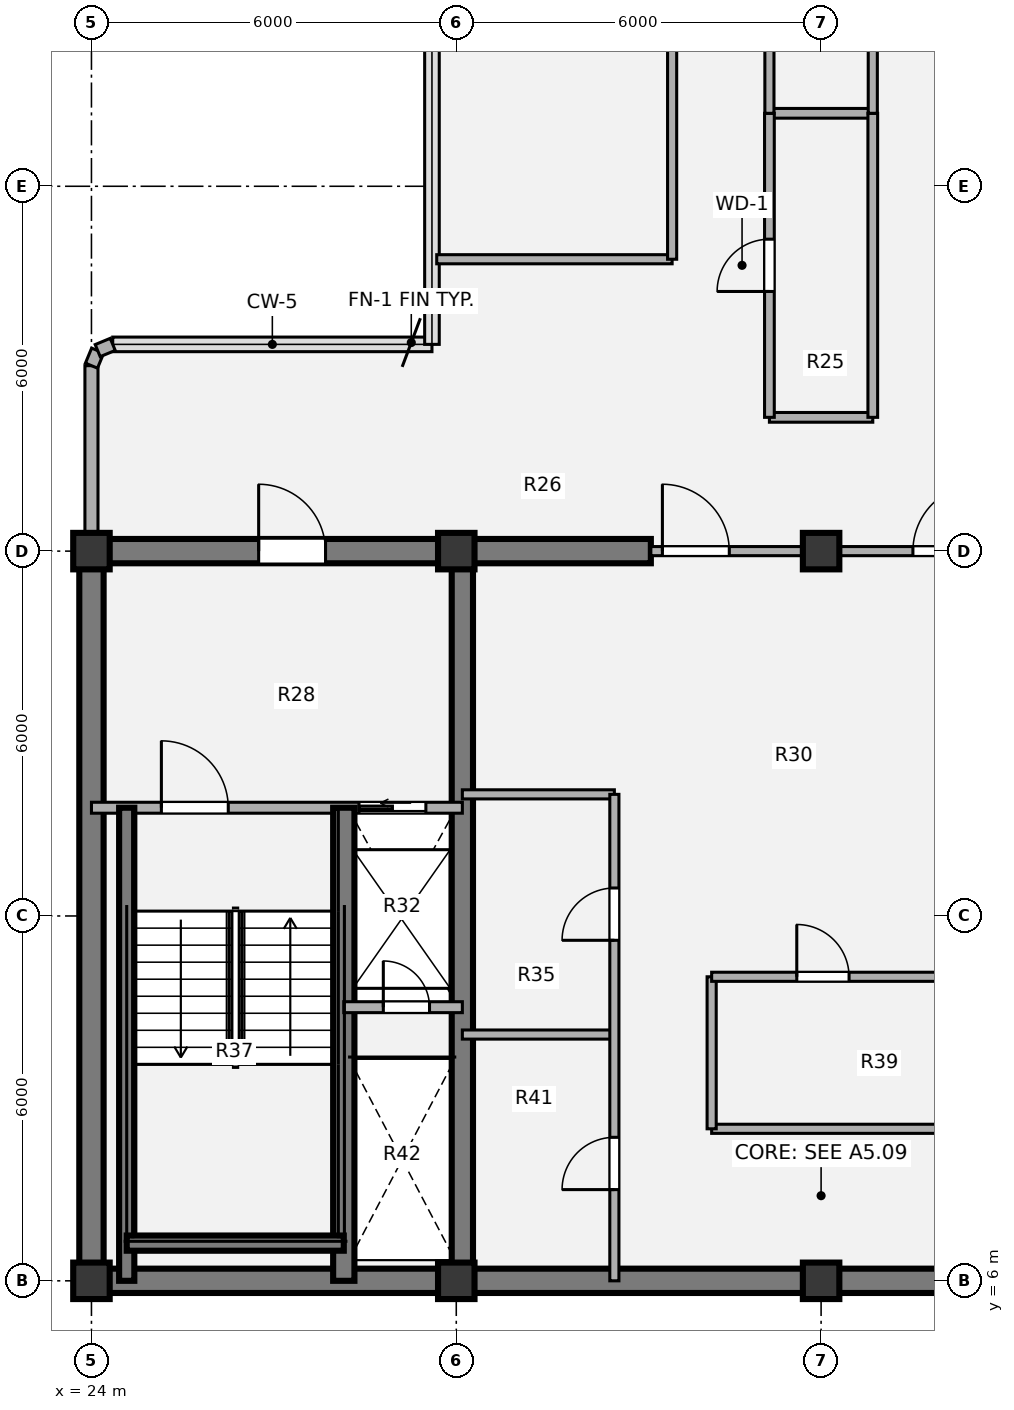
"""IFC4 building model, lengths in metres.
Left out: names, types, materials, properties, quantities, classifications, styles, units other than length and angle.
Written with IfcOpenShell. Run it as: python <this file> out.ifc"""

import sys

from ifc_helpers import new_model, si_unit, direction, frame, frame_2d, origin, origin_2d, place, context, subcontext, project, spatial, rectangle, extrude, source, transform, mapped, element, fill, save


model = new_model("IFC4")
c1 = context("Model", 3, precision=1e-05, world=origin(), true_north=direction((0.0, 1.0)))
c2 = subcontext(c1, "Body", "Model", "MODEL_VIEW")
j1 = project(units=[si_unit("LENGTHUNIT", "METRE"), si_unit("PLANEANGLEUNIT", "RADIAN")], contexts=[c1])
p1 = place(None, origin())
s1 = spatial("IfcSite", under=j1, at=p1, CompositionType="ELEMENT")
p2 = place(p1, origin())
s2 = spatial("IfcBuilding", under=s1, at=p2, CompositionType="ELEMENT")
p3 = place(p2, frame((0.0, 0.0, 234.36)))
s3 = spatial("IfcBuildingStorey", under=s2, at=p3, CompositionType="ELEMENT", Elevation=234.36)
m1 = source(origin(), c2, "Body", "SweptSolid", [
    extrude(rectangle(XDim=0.6, YDim=0.6, at=origin_2d()), origin(), (0.0, 0.0, 1.0), 3.78),
])
for number, where, z_axis, x_axis in (
    (1, (24.0, 6.0, 0.0), (0.0, 0.0, 1.0), (1.0, 0.0, 0.0)),
    (2, (30.0, 6.0, 0.0), (0.0, 0.0, 1.0), (1.0, 0.0, 0.0)),
    (3, (36.0, 6.0, 0.0), (0.0, 0.0, 1.0), (1.0, 0.0, 0.0)),
    (4, (24.0, 18.0, 0.0), (0.0, 0.0, 1.0), (1.0, 0.0, 0.0)),
    (5, (30.0, 18.0, 0.0), (0.0, 0.0, 1.0), (1.0, 0.0, 0.0)),
    (6, (36.0, 18.0, 0.0), (0.0, 0.0, 1.0), (1.0, 0.0, 0.0)),
):
    element("IfcColumn", number, at=place(p3, frame(where, z_axis=z_axis, x_axis=x_axis)), inside=s3, PredefinedType="COLUMN", context=c2, shape_type="MappedRepresentation", body=[
        mapped(m1, transform((0.0, 0.0, 0.0), x_axis=(1.0, 0.0, 0.0), y_axis=(0.0, 1.0, 0.0), z_axis=(0.0, 0.0, 1.0), scale=1.0)),
    ])
p4 = place(p3, frame((48.2, 6.0, 0.0), z_axis=(0.0, 0.0, 1.0), x_axis=(-1.0, 0.0, 0.0)))
e7 = element("IfcWall", 7, at=p4, inside=s3, PredefinedType="SHEAR", context=c2, shape_type="SweptSolid", body=[
    extrude(rectangle(XDim=24.4, YDim=0.4, at=frame_2d((12.2, 0.0))), origin(), (0.0, 0.0, 1.0), 3.78),
])
p5 = place(p3, frame((24.0, 6.0, 0.0), z_axis=(0.0, 0.0, 1.0), x_axis=(0.0, 1.0, 0.0)))
e8 = element("IfcWall", 8, at=p5, inside=s3, PredefinedType="SHEAR", context=c2, shape_type="SweptSolid", body=[
    extrude(rectangle(XDim=12.0, YDim=0.4, at=frame_2d((6.0, 0.0))), origin(), (0.0, 0.0, 1.0), 3.78),
])
p6 = place(p3, frame((23.8, 18.0, 0.0), z_axis=(0.0, 0.0, 1.0), x_axis=(1.0, 0.0, 0.0)))
e9 = element("IfcWall", 9, at=p6, inside=s3, PredefinedType="SHEAR", context=c2, shape_type="SweptSolid", body=[
    extrude(rectangle(XDim=9.4, YDim=0.4, at=frame_2d((4.7, 0.0))), origin(), (0.0, 0.0, 1.0), 3.78),
])
p7 = place(p6, frame((2.95, 0.0, 0.0)))
e10 = element("IfcOpeningElement", 10, at=p7, cuts=e9, PredefinedType="OPENING", context=c2, shape_type="SweptSolid", body=[
    extrude(rectangle(XDim=1.1, YDim=2.1, at=origin_2d()), frame((0.55, 0.21, 1.05), z_axis=(0.0, -1.0, 0.0), x_axis=(1.0, 0.0, 0.0)), (0.0, 0.0, 1.0), 0.42),
])
p8 = place(p3, frame((30.1, 6.0, 0.0), z_axis=(0.0, 0.0, 1.0), x_axis=(0.0, 1.0, 0.0)))
e11 = element("IfcWall", 11, at=p8, inside=s3, PredefinedType="SHEAR", context=c2, shape_type="SweptSolid", body=[
    extrude(rectangle(XDim=12.0, YDim=0.35, at=frame_2d((6.0, 0.0))), origin(), (0.0, 0.0, 1.0), 3.78),
])
p9 = place(p3, frame((24.0, 18.28, 0.0), z_axis=(0.0, 0.0, 1.0), x_axis=(0.0, 1.0, 0.0)))
e12 = element("IfcWall", 12, at=p9, inside=s3, PredefinedType="SOLIDWALL", context=c2, shape_type="SweptSolid", body=[
    extrude(rectangle(XDim=2.77, YDim=0.215, at=frame_2d((1.385, 0.0))), origin(), (0.0, 0.0, 1.0), 2.718),
])
p10 = place(p3, frame((24.0, 21.05, 0.0), z_axis=(0.0, 0.0, 1.0), x_axis=(0.382673670509, 0.923883575944, 0.0)))
e13 = element("IfcWall", 13, at=p10, inside=s3, PredefinedType="SOLIDWALL", context=c2, shape_type="SweptSolid", body=[
    extrude(rectangle(XDim=0.268, YDim=0.215, at=frame_2d((0.134, 0.0))), origin(), (0.0, 0.0, 1.0), 3.53),
])
p11 = place(p3, frame((24.103, 21.298, 0.0), z_axis=(0.0, 0.0, 1.0), x_axis=(0.924205486139, 0.381895560841, 0.0)))
e14 = element("IfcWall", 14, at=p11, inside=s3, PredefinedType="SOLIDWALL", context=c2, shape_type="SweptSolid", body=[
    extrude(rectangle(XDim=0.268, YDim=0.215, at=frame_2d((0.134, 0.0))), origin(), (0.0, 0.0, 1.0), 3.53),
])
p12 = place(p3, frame((30.1, 14.0, 0.0), z_axis=(0.0, 0.0, 1.0), x_axis=(1.0, 0.0, 0.0)))
e15 = element("IfcWall", 15, at=p12, inside=s3, PredefinedType="PARTITIONING", context=c2, shape_type="SweptSolid", body=[
    extrude(rectangle(XDim=2.5, YDim=0.15, at=frame_2d((1.25, 0.0))), origin(), (0.0, 0.0, 1.0), 3.5),
])
p13 = place(p3, frame((34.2, 8.5, 0.0), z_axis=(0.0, 0.0, 1.0), x_axis=(1.0, 0.0, 0.0)))
e16 = element("IfcWall", 16, at=p13, inside=s3, PredefinedType="PARTITIONING", context=c2, shape_type="SweptSolid", body=[
    extrude(rectangle(XDim=3.8, YDim=0.15, at=frame_2d((1.9, 0.0))), origin(), (0.0, 0.0, 1.0), 3.5),
])
p14 = place(p3, frame((34.2, 8.5, 0.0), z_axis=(0.0, 0.0, 1.0), x_axis=(0.0, 1.0, 0.0)))
e17 = element("IfcWall", 17, at=p14, inside=s3, PredefinedType="PARTITIONING", context=c2, shape_type="SweptSolid", body=[
    extrude(rectangle(XDim=2.5, YDim=0.15, at=frame_2d((1.25, 0.0))), origin(), (0.0, 0.0, 1.0), 3.5),
])
p15 = place(p3, frame((34.2, 11.0, 0.0), z_axis=(0.0, 0.0, 1.0), x_axis=(1.0, 0.0, 0.0)))
e18 = element("IfcWall", 18, at=p15, inside=s3, PredefinedType="PARTITIONING", context=c2, shape_type="SweptSolid", body=[
    extrude(rectangle(XDim=3.8, YDim=0.15, at=frame_2d((1.9, 0.0))), origin(), (0.0, 0.0, 1.0), 3.5),
])
p16 = place(p15, frame((1.4, 0.0, 0.0)))
e19 = element("IfcOpeningElement", 19, at=p16, cuts=e18, PredefinedType="OPENING", context=c2, shape_type="SweptSolid", body=[
    extrude(rectangle(XDim=0.86, YDim=2.1, at=origin_2d()), frame((0.43, 0.085, 1.05), z_axis=(0.0, -1.0, 0.0), x_axis=(1.0, 0.0, 0.0)), (0.0, 0.0, 1.0), 0.17),
])
p17 = place(p3, frame((30.1, 10.05, 0.0), z_axis=(0.0, 0.0, 1.0), x_axis=(1.0, 0.0, 0.0)))
e20 = element("IfcWall", 20, at=p17, inside=s3, PredefinedType="PARTITIONING", context=c2, shape_type="SweptSolid", body=[
    extrude(rectangle(XDim=2.5, YDim=0.15, at=frame_2d((1.25, 0.0))), origin(), (0.0, 0.0, 1.0), 3.5),
])
p18 = place(p3, frame((32.6, 6.0, 0.0), z_axis=(0.0, 0.0, 1.0), x_axis=(0.0, 1.0, 0.0)))
e21 = element("IfcWall", 21, at=p18, inside=s3, PredefinedType="PARTITIONING", context=c2, shape_type="SweptSolid", body=[
    extrude(rectangle(XDim=8.0, YDim=0.15, at=frame_2d((4.0, 0.0))), origin(), (0.0, 0.0, 1.0), 3.5),
])
p19 = place(p18, frame((1.5, 0.0, 0.0)))
e22 = element("IfcOpeningElement", 22, at=p19, cuts=e21, PredefinedType="OPENING", context=c2, shape_type="SweptSolid", body=[
    extrude(rectangle(XDim=0.86, YDim=2.1, at=origin_2d()), frame((0.43, 0.085, 1.05), z_axis=(0.0, -1.0, 0.0), x_axis=(1.0, 0.0, 0.0)), (0.0, 0.0, 1.0), 0.17),
])
p20 = place(p18, frame((5.6, 0.0, 0.0)))
e23 = element("IfcOpeningElement", 23, at=p20, cuts=e21, PredefinedType="OPENING", context=c2, shape_type="SweptSolid", body=[
    extrude(rectangle(XDim=0.86, YDim=2.1, at=origin_2d()), frame((0.43, 0.085, 1.05), z_axis=(0.0, -1.0, 0.0), x_axis=(1.0, 0.0, 0.0)), (0.0, 0.0, 1.0), 0.17),
])
p21 = place(p3, frame((33.2, 18.0, 0.0), z_axis=(0.0, 0.0, 1.0), x_axis=(1.0, 0.0, 0.0)))
e24 = element("IfcWall", 24, at=p21, inside=s3, PredefinedType="PARTITIONING", context=c2, shape_type="SweptSolid", body=[
    extrude(rectangle(XDim=5.6, YDim=0.15, at=frame_2d((2.8, 0.0))), origin(), (0.0, 0.0, 1.0), 2.515),
])
p22 = place(p21, frame((0.19, 0.0, 0.0)))
e25 = element("IfcOpeningElement", 25, at=p22, cuts=e24, PredefinedType="OPENING", context=c2, shape_type="SweptSolid", body=[
    extrude(rectangle(XDim=1.1, YDim=2.1, at=origin_2d()), frame((0.55, 0.085, 1.05), z_axis=(0.0, -1.0, 0.0), x_axis=(1.0, 0.0, 0.0)), (0.0, 0.0, 1.0), 0.17),
])
p23 = place(p21, frame((4.31, 0.0, 0.0)))
e26 = element("IfcOpeningElement", 26, at=p23, cuts=e24, PredefinedType="OPENING", context=c2, shape_type="SweptSolid", body=[
    extrude(rectangle(XDim=1.1, YDim=2.1, at=origin_2d()), frame((0.55, 0.085, 1.05), z_axis=(0.0, -1.0, 0.0), x_axis=(1.0, 0.0, 0.0)), (0.0, 0.0, 1.0), 0.17),
])
p24 = place(p3, frame((24.0, 13.78, 0.0), z_axis=(0.0, 0.0, 1.0), x_axis=(1.0, 0.0, 0.0)))
e27 = element("IfcWall", 27, at=p24, inside=s3, PredefinedType="PARTITIONING", context=c2, shape_type="SweptSolid", body=[
    extrude(rectangle(XDim=6.1, YDim=0.18, at=frame_2d((3.05, 0.0))), origin(), (0.0, 0.0, 1.0), 3.5),
])
p25 = place(p24, frame((1.15, 0.0, 0.0)))
e28 = element("IfcOpeningElement", 28, at=p25, cuts=e27, PredefinedType="OPENING", context=c2, shape_type="SweptSolid", body=[
    extrude(rectangle(XDim=1.1, YDim=2.1, at=origin_2d()), frame((0.55, 0.1, 1.05), z_axis=(0.0, -1.0, 0.0), x_axis=(1.0, 0.0, 0.0)), (0.0, 0.0, 1.0), 0.2),
])
p26 = place(p24, frame((4.4, 0.0, 0.0)))
e29 = element("IfcOpeningElement", 29, at=p26, cuts=e27, PredefinedType="OPENING", context=c2, shape_type="SweptSolid", body=[
    extrude(rectangle(XDim=1.1, YDim=2.1, at=origin_2d()), frame((0.55, 0.1, 1.05), z_axis=(0.0, -1.0, 0.0), x_axis=(1.0, 0.0, 0.0)), (0.0, 0.0, 1.0), 0.2),
])
p27 = place(p3, frame((28.15, 6.0, 0.0), z_axis=(0.0, 0.0, 1.0), x_axis=(0.0, 1.0, 0.0)))
e30 = element("IfcWall", 30, at=p27, inside=s3, PredefinedType="SHEAR", context=c2, shape_type="SweptSolid", body=[
    extrude(rectangle(XDim=7.78, YDim=0.35, at=frame_2d((3.89, 0.0))), origin(), (0.0, 0.0, 1.0), 3.85),
])
p28 = place(p3, frame((24.58, 6.0, 0.0), z_axis=(0.0, 0.0, 1.0), x_axis=(0.0, 1.0, 0.0)))
e31 = element("IfcWall", 31, at=p28, inside=s3, PredefinedType="SHEAR", context=c2, shape_type="SweptSolid", body=[
    extrude(rectangle(XDim=7.78, YDim=0.25, at=frame_2d((3.89, 0.0))), origin(), (0.0, 0.0, 1.0), 3.85),
])
p29 = place(p3, frame((24.58, 6.62, 0.0), z_axis=(0.0, 0.0, 1.0), x_axis=(1.0, 0.0, 0.0)))
e32 = element("IfcWall", 32, at=p29, inside=s3, PredefinedType="SHEAR", context=c2, shape_type="SweptSolid", body=[
    extrude(rectangle(XDim=3.57, YDim=0.25, at=frame_2d((1.785, 0.0))), origin(), (0.0, 0.0, 1.0), 3.85),
])
p30 = place(p3, frame((28.15, 10.5, 0.0), z_axis=(0.0, 0.0, 1.0), x_axis=(1.0, 0.0, 0.0)))
e33 = element("IfcWall", 33, at=p30, inside=s3, PredefinedType="PARTITIONING", context=c2, shape_type="SweptSolid", body=[
    extrude(rectangle(XDim=1.95, YDim=0.18, at=frame_2d((0.975, 0.0))), origin(), (0.0, 0.0, 1.0), 3.5),
])
p31 = place(p30, frame((0.65, 0.0, 0.0)))
e34 = element("IfcOpeningElement", 34, at=p31, cuts=e33, PredefinedType="OPENING", context=c2, shape_type="SweptSolid", body=[
    extrude(rectangle(XDim=0.76, YDim=2.05, at=origin_2d()), frame((0.38, 0.1, 1.025), z_axis=(0.0, -1.0, 0.0), x_axis=(1.0, 0.0, 0.0)), (0.0, 0.0, 1.0), 0.2),
])
p32 = place(p3, frame((35.15, 20.2, 0.0), z_axis=(0.0, 0.0, 1.0), x_axis=(1.0, 0.0, 0.0)))
e35 = element("IfcWall", 35, at=p32, inside=s3, PredefinedType="PLUMBINGWALL", context=c2, shape_type="SweptSolid", body=[
    extrude(rectangle(XDim=1.7, YDim=0.16, at=frame_2d((0.85, 0.0))), origin(), (0.0, 0.0, 1.0), 3.5),
])
p33 = place(p3, frame((29.678, 22.8, 0.0), z_axis=(0.0, 0.0, 1.0), x_axis=(1.0, 0.0, 0.0)))
e36 = element("IfcWall", 36, at=p33, inside=s3, PredefinedType="PARTITIONING", context=c2, shape_type="SweptSolid", body=[
    extrude(rectangle(XDim=3.872, YDim=0.15, at=frame_2d((1.936, 0.0))), origin(), (0.0, 0.0, 1.0), 3.5),
])
p34 = place(p3, frame((35.15, 25.2, 0.0), z_axis=(0.0, 0.0, 1.0), x_axis=(1.0, 0.0, 0.0)))
e37 = element("IfcWall", 37, at=p34, inside=s3, PredefinedType="PLUMBINGWALL", context=c2, shape_type="SweptSolid", body=[
    extrude(rectangle(XDim=1.7, YDim=0.16, at=frame_2d((0.85, 0.0))), origin(), (0.0, 0.0, 1.0), 3.5),
])
p35 = place(p3, frame((33.55, 22.8, 0.0), z_axis=(0.0, 0.0, 1.0), x_axis=(0.0, 1.0, 0.0)))
e38 = element("IfcWall", 38, at=p35, inside=s3, PredefinedType="PARTITIONING", context=c2, shape_type="SweptSolid", body=[
    extrude(rectangle(XDim=18.8, YDim=0.15, at=frame_2d((9.4, 0.0))), origin(), (0.0, 0.0, 1.0), 3.5),
])
p36 = place(p35, frame((8.84, 0.0, 0.0)))
e39 = element("IfcOpeningElement", 39, at=p36, cuts=e38, PredefinedType="OPENING", context=c2, shape_type="SweptSolid", body=[
    extrude(rectangle(XDim=0.86, YDim=2.1, at=origin_2d()), frame((0.43, 0.085, 1.05), z_axis=(0.0, -1.0, 0.0), x_axis=(1.0, 0.0, 0.0)), (0.0, 0.0, 1.0), 0.17),
])
p37 = place(p3, frame((35.15, 20.2, 0.0), z_axis=(0.0, 0.0, 1.0), x_axis=(0.0, 1.0, 0.0)))
e40 = element("IfcWall", 40, at=p37, inside=s3, PredefinedType="PLUMBINGWALL", context=c2, shape_type="SweptSolid", body=[
    extrude(rectangle(XDim=5.0, YDim=0.16, at=frame_2d((2.5, 0.0))), origin(), (0.0, 0.0, 1.0), 3.5),
])
p38 = place(p37, frame((2.07, 0.0, 0.0)))
e41 = element("IfcOpeningElement", 41, at=p38, cuts=e40, PredefinedType="OPENING", context=c2, shape_type="SweptSolid", body=[
    extrude(rectangle(XDim=0.86, YDim=2.1, at=origin_2d()), frame((0.43, 0.09, 1.05), z_axis=(0.0, -1.0, 0.0), x_axis=(1.0, 0.0, 0.0)), (0.0, 0.0, 1.0), 0.18),
])
p39 = place(p3, frame((35.15, 25.2, 0.0), z_axis=(0.0, 0.0, 1.0), x_axis=(0.0, 1.0, 0.0)))
e42 = element("IfcWall", 42, at=p39, inside=s3, PredefinedType="PARTITIONING", context=c2, shape_type="SweptSolid", body=[
    extrude(rectangle(XDim=19.42, YDim=0.15, at=frame_2d((9.71, 0.0))), origin(), (0.0, 0.0, 1.0), 3.5),
])
p40 = place(p3, frame((36.85, 20.2, 0.0), z_axis=(0.0, 0.0, 1.0), x_axis=(0.0, 1.0, 0.0)))
e43 = element("IfcWall", 43, at=p40, inside=s3, PredefinedType="PLUMBINGWALL", context=c2, shape_type="SweptSolid", body=[
    extrude(rectangle(XDim=5.0, YDim=0.16, at=frame_2d((2.5, 0.0))), origin(), (0.0, 0.0, 1.0), 3.5),
])
p41 = place(p3, frame((36.85, 25.2, 0.0), z_axis=(0.0, 0.0, 1.0), x_axis=(0.0, 1.0, 0.0)))
e44 = element("IfcWall", 44, at=p41, inside=s3, PredefinedType="PARTITIONING", context=c2, shape_type="SweptSolid", body=[
    extrude(rectangle(XDim=19.42, YDim=0.15, at=frame_2d((9.71, 0.0))), origin(), (0.0, 0.0, 1.0), 3.5),
])
p42 = place(p41, frame((9.185, 0.0, 0.0)))
e45 = element("IfcOpeningElement", 45, at=p42, cuts=e44, PredefinedType="OPENING", context=c2, shape_type="SweptSolid", body=[
    extrude(rectangle(XDim=1.05, YDim=2.1, at=origin_2d()), frame((0.525, 0.085, 1.05), z_axis=(0.0, -1.0, 0.0), x_axis=(1.0, 0.0, 0.0)), (0.0, 0.0, 1.0), 0.17),
])
m2 = source(origin(), c2, "Body", "SweptSolid", [
    extrude(rectangle(XDim=0.86, YDim=2.1, at=origin_2d()), frame((0.43, 0.025, 1.05), z_axis=(0.0, -1.0, 0.0), x_axis=(1.0, 0.0, 0.0)), (0.0, 0.0, 1.0), 0.05),
])
p43 = place(p16, origin())
e46 = element("IfcDoor", 46, at=p43, inside=s3, OperationType="SINGLE_SWING_LEFT", PredefinedType="DOOR", context=c2, shape_type="MappedRepresentation", body=[
    mapped(m2, transform((0.0, 0.0, 0.0), x_axis=(1.0, 0.0, 0.0), y_axis=(0.0, 1.0, 0.0), z_axis=(0.0, 0.0, 1.0), scale=1.0)),
])
fill(e19, e46)
p44 = place(p19, origin())
e47 = element("IfcDoor", 47, at=p44, inside=s3, OperationType="SINGLE_SWING_LEFT", PredefinedType="DOOR", context=c2, shape_type="MappedRepresentation", body=[
    mapped(m2, transform((0.0, 0.0, 0.0), x_axis=(1.0, 0.0, 0.0), y_axis=(0.0, 1.0, 0.0), z_axis=(0.0, 0.0, 1.0), scale=1.0)),
])
fill(e22, e47)
p45 = place(p20, origin())
e48 = element("IfcDoor", 48, at=p45, inside=s3, OperationType="SINGLE_SWING_LEFT", PredefinedType="DOOR", context=c2, shape_type="MappedRepresentation", body=[
    mapped(m2, transform((0.0, 0.0, 0.0), x_axis=(1.0, 0.0, 0.0), y_axis=(0.0, 1.0, 0.0), z_axis=(0.0, 0.0, 1.0), scale=1.0)),
])
fill(e23, e48)
m3 = source(origin(), c2, "Body", "SweptSolid", [
    extrude(rectangle(XDim=1.1, YDim=2.1, at=origin_2d()), frame((0.55, 0.025, 1.05), z_axis=(0.0, -1.0, 0.0), x_axis=(1.0, 0.0, 0.0)), (0.0, 0.0, 1.0), 0.05),
])
p46 = place(p22, origin())
e49 = element("IfcDoor", 49, at=p46, inside=s3, OperationType="SINGLE_SWING_LEFT", PredefinedType="DOOR", context=c2, shape_type="MappedRepresentation", body=[
    mapped(m3, transform((0.0, 0.0, 0.0), x_axis=(1.0, 0.0, 0.0), y_axis=(0.0, 1.0, 0.0), z_axis=(0.0, 0.0, 1.0), scale=1.0)),
])
fill(e25, e49)
p47 = place(p23, origin())
e50 = element("IfcDoor", 50, at=p47, inside=s3, OperationType="SINGLE_SWING_RIGHT", PredefinedType="DOOR", context=c2, shape_type="MappedRepresentation", body=[
    mapped(m3, transform((0.0, 0.0, 0.0), x_axis=(1.0, 0.0, 0.0), y_axis=(0.0, 1.0, 0.0), z_axis=(0.0, 0.0, 1.0), scale=1.0)),
])
fill(e26, e50)
m4 = source(origin(), c2, "Body", "SweptSolid", [
    extrude(rectangle(XDim=1.1, YDim=2.1, at=origin_2d()), frame((0.55, 0.025, 1.05), z_axis=(0.0, -1.0, 0.0), x_axis=(1.0, 0.0, 0.0)), (0.0, 0.0, 1.0), 0.05),
])
p48 = place(p25, origin())
e51 = element("IfcDoor", 51, at=p48, inside=s3, OperationType="SINGLE_SWING_LEFT", PredefinedType="DOOR", context=c2, shape_type="MappedRepresentation", body=[
    mapped(m4, transform((0.0, 0.0, 0.0), x_axis=(1.0, 0.0, 0.0), y_axis=(0.0, 1.0, 0.0), z_axis=(0.0, 0.0, 1.0), scale=1.0)),
])
fill(e28, e51)
m5 = source(origin(), c2, "Body", "SweptSolid", [
    extrude(rectangle(XDim=1.1, YDim=2.1, at=origin_2d()), frame((0.55, 0.025, 1.05), z_axis=(0.0, -1.0, 0.0), x_axis=(1.0, 0.0, 0.0)), (0.0, 0.0, 1.0), 0.05),
])
p49 = place(p26, origin())
e52 = element("IfcDoor", 52, at=p49, inside=s3, OperationType="SLIDING_TO_LEFT", PredefinedType="DOOR", context=c2, shape_type="MappedRepresentation", body=[
    mapped(m5, transform((0.0, 0.0, 0.0), x_axis=(1.0, 0.0, 0.0), y_axis=(0.0, 1.0, 0.0), z_axis=(0.0, 0.0, 1.0), scale=1.0)),
])
fill(e29, e52)
m6 = source(origin(), c2, "Body", "SweptSolid", [
    extrude(rectangle(XDim=0.76, YDim=2.05, at=origin_2d()), frame((0.38, 0.025, 1.025), z_axis=(0.0, -1.0, 0.0), x_axis=(1.0, 0.0, 0.0)), (0.0, 0.0, 1.0), 0.05),
])
p50 = place(p31, origin())
e53 = element("IfcDoor", 53, at=p50, inside=s3, OperationType="SINGLE_SWING_LEFT", PredefinedType="DOOR", context=c2, shape_type="MappedRepresentation", body=[
    mapped(m6, transform((0.0, 0.0, 0.0), x_axis=(1.0, 0.0, 0.0), y_axis=(0.0, 1.0, 0.0), z_axis=(0.0, 0.0, 1.0), scale=1.0)),
])
fill(e34, e53)
p51 = place(p7, origin())
e54 = element("IfcDoor", 54, at=p51, inside=s3, OperationType="SINGLE_SWING_LEFT", PredefinedType="DOOR", context=c2, shape_type="MappedRepresentation", body=[
    mapped(m3, transform((0.0, 0.0, 0.0), x_axis=(1.0, 0.0, 0.0), y_axis=(0.0, 1.0, 0.0), z_axis=(0.0, 0.0, 1.0), scale=1.0)),
])
fill(e10, e54)
m7 = source(origin(), c2, "Body", "SweptSolid", [
    extrude(rectangle(XDim=0.86, YDim=2.1, at=origin_2d()), frame((0.43, 0.025, 1.05), z_axis=(0.0, -1.0, 0.0), x_axis=(1.0, 0.0, 0.0)), (0.0, 0.0, 1.0), 0.05),
])
p52 = place(p38, origin())
e55 = element("IfcDoor", 55, at=p52, inside=s3, OperationType="SINGLE_SWING_LEFT", PredefinedType="DOOR", context=c2, shape_type="MappedRepresentation", body=[
    mapped(m7, transform((0.0, 0.0, 0.0), x_axis=(1.0, 0.0, 0.0), y_axis=(0.0, 1.0, 0.0), z_axis=(0.0, 0.0, 1.0), scale=1.0)),
])
fill(e41, e55)
save(model, sys.argv[1])
